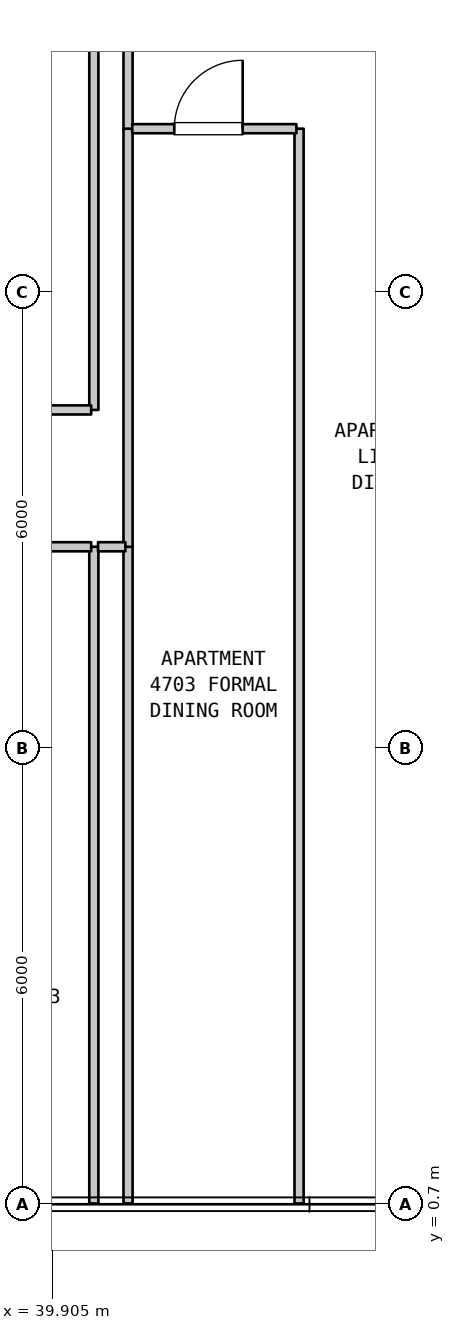
"""IFC4 building model, lengths in metres.
Left out: names, types, materials, properties, quantities, classifications, styles, units other than length and angle.
Written with IfcOpenShell. Run it as: python <this file> out.ifc"""

import sys

from ifc_helpers import new_model, si_unit, direction, frame, frame_2d, origin, place, context, subcontext, project, spatial, rectangle, extrude, element, fill, save


model = new_model("IFC4")
c1 = context("Model", 3, precision=1e-05, world=origin(), true_north=direction((0.0, 1.0)))
c2 = subcontext(c1, "Body", "Model", "MODEL_VIEW")
j1 = project(units=[si_unit("LENGTHUNIT", "METRE"), si_unit("PLANEANGLEUNIT", "RADIAN")], contexts=[c1])
p1 = place(None, origin())
s1 = spatial("IfcSite", under=j1, at=p1, CompositionType="ELEMENT")
p2 = place(p1, origin())
s2 = spatial("IfcBuilding", under=s1, at=p2, CompositionType="ELEMENT")
p3 = place(p2, frame((0.0, 0.0, 192.1)))
s3 = spatial("IfcBuildingStorey", under=s2, at=p3, CompositionType="ELEMENT", Elevation=192.1)
p4 = place(p3, frame((40.45, 0.71, 0.0), z_axis=(0.0, 0.0, 1.0), x_axis=(0.0, 1.0, 0.0)))
e1 = element("IfcWall", 1, at=p4, inside=s3, PredefinedType="PARTITIONING", context=c2, shape_type="SweptSolid", body=[
    extrude(rectangle(XDim=8.64, YDim=0.12, at=frame_2d((4.32, 0.0))), origin(), (0.0, 0.0, 1.0), 3.39),
])
p5 = place(p3, frame((40.45, 11.15, 0.0), z_axis=(0.0, 0.0, 1.0), x_axis=(0.0, 1.0, 0.0)))
e2 = element("IfcWall", 2, at=p5, inside=s3, PredefinedType="PARTITIONING", context=c2, shape_type="SweptSolid", body=[
    extrude(rectangle(XDim=6.15, YDim=0.12, at=frame_2d((3.075, 0.0))), origin(), (0.0, 0.0, 1.0), 3.39),
])
p6 = place(p3, frame((40.9, 0.71, 0.0), z_axis=(0.0, 0.0, 1.0), x_axis=(0.0, 1.0, 0.0)))
e3 = element("IfcWall", 3, at=p6, inside=s3, PredefinedType="PARTITIONING", context=c2, shape_type="SweptSolid", body=[
    extrude(rectangle(XDim=8.64, YDim=0.12, at=frame_2d((4.32, 0.0))), origin(), (0.0, 0.0, 1.0), 3.39),
])
p7 = place(p3, frame((40.9, 9.35, 0.0), z_axis=(0.0, 0.0, 1.0), x_axis=(0.0, 1.0, 0.0)))
e4 = element("IfcWall", 4, at=p7, inside=s3, PredefinedType="PARTITIONING", context=c2, shape_type="SweptSolid", body=[
    extrude(rectangle(XDim=5.5, YDim=0.12, at=frame_2d((2.75, 0.0))), origin(), (0.0, 0.0, 1.0), 3.39),
])
p8 = place(p3, frame((40.9, 14.85, 0.0), z_axis=(0.0, 0.0, 1.0), x_axis=(0.0, 1.0, 0.0)))
e5 = element("IfcWall", 5, at=p8, inside=s3, PredefinedType="PARTITIONING", context=c2, shape_type="SweptSolid", body=[
    extrude(rectangle(XDim=2.45, YDim=0.12, at=frame_2d((1.225, 0.0))), origin(), (0.0, 0.0, 1.0), 3.39),
])
p9 = place(p3, frame((43.15, 0.71, 0.0), z_axis=(0.0, 0.0, 1.0), x_axis=(0.0, 1.0, 0.0)))
e6 = element("IfcWall", 6, at=p9, inside=s3, PredefinedType="PARTITIONING", context=c2, shape_type="SweptSolid", body=[
    extrude(rectangle(XDim=14.14, YDim=0.12, at=frame_2d((7.07, 0.0))), origin(), (0.0, 0.0, 1.0), 3.39),
])
p10 = place(p3, frame((31.495, 9.35, 0.0), z_axis=(0.0, 0.0, 1.0), x_axis=(1.0, 0.0, 0.0)))
e7 = element("IfcWall", 7, at=p10, inside=s3, PredefinedType="PARTITIONING", context=c2, shape_type="SweptSolid", body=[
    extrude(rectangle(XDim=8.92, YDim=0.12, at=frame_2d((4.46, 0.0))), origin(), (0.0, 0.0, 1.0), 3.39),
])
p11 = place(p10, frame((1.111, 0.0, 0.0)))
e8 = element("IfcOpeningElement", 8, at=p11, cuts=e7, PredefinedType="OPENING", context=c2, shape_type="SweptSolid", body=[
    extrude(rectangle(XDim=0.9, YDim=2.15, at=frame_2d((0.45, 1.075))), frame((0.0, 0.07, 0.0), z_axis=(0.0, -1.0, 0.0), x_axis=(1.0, 0.0, 0.0)), (0.0, 0.0, 1.0), 0.14),
])
p12 = place(p10, frame((3.937, 0.0, 0.0)))
e9 = element("IfcOpeningElement", 9, at=p12, cuts=e7, PredefinedType="OPENING", context=c2, shape_type="SweptSolid", body=[
    extrude(rectangle(XDim=0.9, YDim=2.15, at=frame_2d((0.45, 1.075))), frame((0.0, 0.07, 0.0), z_axis=(0.0, -1.0, 0.0), x_axis=(1.0, 0.0, 0.0)), (0.0, 0.0, 1.0), 0.14),
])
p13 = place(p10, frame((6.768, 0.0, 0.0)))
e10 = element("IfcOpeningElement", 10, at=p13, cuts=e7, PredefinedType="OPENING", context=c2, shape_type="SweptSolid", body=[
    extrude(rectangle(XDim=0.9, YDim=2.15, at=frame_2d((0.45, 1.075))), frame((0.0, 0.07, 0.0), z_axis=(0.0, -1.0, 0.0), x_axis=(1.0, 0.0, 0.0)), (0.0, 0.0, 1.0), 0.14),
])
p14 = place(p3, frame((40.505, 9.35, 0.0), z_axis=(0.0, 0.0, 1.0), x_axis=(1.0, 0.0, 0.0)))
e11 = element("IfcWall", 11, at=p14, inside=s3, PredefinedType="PARTITIONING", context=c2, shape_type="SweptSolid", body=[
    extrude(rectangle(XDim=0.36, YDim=0.12, at=frame_2d((0.18, 0.0))), origin(), (0.0, 0.0, 1.0), 3.39),
])
p15 = place(p3, frame((36.883, 11.15, 0.0), z_axis=(0.0, 0.0, 1.0), x_axis=(1.0, 0.0, 0.0)))
e12 = element("IfcWall", 12, at=p15, inside=s3, PredefinedType="PARTITIONING", context=c2, shape_type="SweptSolid", body=[
    extrude(rectangle(XDim=3.532, YDim=0.12, at=frame_2d((1.766, 0.0))), origin(), (0.0, 0.0, 1.0), 3.39),
])
p16 = place(p15, frame((1.242, 0.0, 0.0)))
e13 = element("IfcOpeningElement", 13, at=p16, cuts=e12, PredefinedType="OPENING", context=c2, shape_type="SweptSolid", body=[
    extrude(rectangle(XDim=0.9, YDim=2.15, at=frame_2d((0.45, 1.075))), frame((0.0, 0.07, 0.0), z_axis=(0.0, -1.0, 0.0), x_axis=(1.0, 0.0, 0.0)), (0.0, 0.0, 1.0), 0.14),
])
p17 = place(p3, frame((40.955, 14.85, 0.0), z_axis=(0.0, 0.0, 1.0), x_axis=(1.0, 0.0, 0.0)))
e14 = element("IfcWall", 14, at=p17, inside=s3, PredefinedType="PARTITIONING", context=c2, shape_type="SweptSolid", body=[
    extrude(rectangle(XDim=2.16, YDim=0.12, at=frame_2d((1.08, 0.0))), origin(), (0.0, 0.0, 1.0), 3.39),
])
p18 = place(p17, frame((0.553, 0.0, 0.0)))
e15 = element("IfcOpeningElement", 15, at=p18, cuts=e14, PredefinedType="OPENING", context=c2, shape_type="SweptSolid", body=[
    extrude(rectangle(XDim=0.9, YDim=2.15, at=frame_2d((0.45, 1.075))), frame((0.0, 0.07, 0.0), z_axis=(0.0, -1.0, 0.0), x_axis=(1.0, 0.0, 0.0)), (0.0, 0.0, 1.0), 0.14),
])
p19 = place(p18, origin())
e16 = element("IfcDoor", 16, at=p19, inside=s3, OperationType="SINGLE_SWING_RIGHT", PredefinedType="DOOR", context=c2, shape_type="SweptSolid", body=[
    extrude(rectangle(XDim=0.9, YDim=2.15, at=frame_2d((0.45, 1.075))), frame((0.0, 0.025, 0.0), z_axis=(0.0, -1.0, 0.0), x_axis=(1.0, 0.0, 0.0)), (0.0, 0.0, 1.0), 0.05),
])
fill(e15, e16)
save(model, sys.argv[1])
